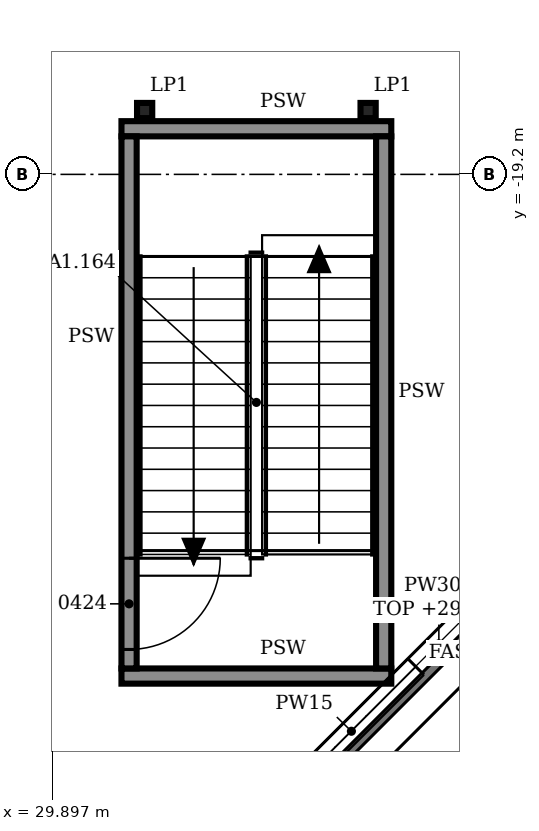
"""IFC4 building model, lengths in metres.
Left out: names, types, materials, properties, quantities, classifications, styles, units other than length and angle.
Written with IfcOpenShell. Run it as: python <this file> out.ifc"""

import sys

from ifc_helpers import new_model, si_unit, direction, frame, frame_2d, origin, origin_2d, place, context, subcontext, project, spatial, rectangle, i_section, extrude, element, fill, save


model = new_model("IFC4")
c1 = context("Model", 3, precision=1e-05, world=origin(), true_north=direction((0.0, 1.0)))
c2 = subcontext(c1, "Body", "Model", "MODEL_VIEW")
j1 = project(units=[si_unit("LENGTHUNIT", "METRE"), si_unit("PLANEANGLEUNIT", "RADIAN")], contexts=[c1])
p1 = place(None, origin())
s1 = spatial("IfcSite", under=j1, at=p1, CompositionType="ELEMENT")
p2 = place(p1, origin())
s2 = spatial("IfcBuilding", under=s1, at=p2, CompositionType="ELEMENT")
p3 = place(p2, frame((0.0, 0.0, 25.8)))
s3 = spatial("IfcBuildingStorey", under=s2, at=p3, CompositionType="ELEMENT", Elevation=25.8)
for number, where, z_axis, x_axis in (
    (1, (31.105, -18.36, 0.0), (0.0, 0.0, 1.0), (1.0, 0.0, 0.0)),
    (2, (34.045, -18.36, 0.0), (0.0, 0.0, 1.0), (1.0, 0.0, 0.0)),
):
    element("IfcColumn", number, at=place(p3, frame(where, z_axis=z_axis, x_axis=x_axis)), inside=s3, PredefinedType="COLUMN", context=c2, shape_type="SweptSolid", body=[
        extrude(i_section(OverallWidth=0.2, OverallDepth=0.2, WebThickness=0.009, FlangeThickness=0.015, FilletRadius=0.018, at=origin_2d()), origin(), (0.0, 0.0, 1.0), 4.8),
    ])
p4 = place(p3, frame((32.675, -27.677, 0.0), z_axis=(0.0, 0.0, 1.0), x_axis=(0.707088024292, 0.707125537583, 0.0)))
e3 = element("IfcWall", 3, at=p4, inside=s3, PredefinedType="SOLIDWALL", context=c2, shape_type="SweptSolid", body=[
    extrude(rectangle(XDim=6.508, YDim=0.3, at=frame_2d((3.254, 0.0))), origin(), (0.0, 0.0, 1.0), 4.0),
])
p5 = place(p4, frame((0.427, 0.0, 0.9)))
e4 = element("IfcOpeningElement", 4, at=p5, cuts=e3, PredefinedType="OPENING", context=c2, shape_type="SweptSolid", body=[
    extrude(rectangle(XDim=2.4, YDim=1.5, at=frame_2d((1.2, 0.75))), frame((0.0, 0.16, 0.0), z_axis=(0.0, -1.0, 0.0), x_axis=(1.0, 0.0, 0.0)), (0.0, 0.0, 1.0), 0.32),
])
p6 = place(p4, frame((3.681, 0.0, 0.9)))
e5 = element("IfcOpeningElement", 5, at=p6, cuts=e3, PredefinedType="OPENING", context=c2, shape_type="SweptSolid", body=[
    extrude(rectangle(XDim=2.4, YDim=1.5, at=frame_2d((1.2, 0.75))), frame((0.0, 0.16, 0.0), z_axis=(0.0, -1.0, 0.0), x_axis=(1.0, 0.0, 0.0)), (0.0, 0.0, 1.0), 0.32),
])
p7 = place(p3, frame((30.8, -25.8, 0.0), z_axis=(0.0, 0.0, 1.0), x_axis=(1.0, 0.0, 0.0)))
e6 = element("IfcWall", 6, at=p7, inside=s3, PredefinedType="SOLIDWALL", context=c2, shape_type="SweptSolid", body=[
    extrude(rectangle(XDim=3.55, YDim=0.2, at=frame_2d((1.775, 0.0))), origin(), (0.0, 0.0, 1.0), 4.6),
])
p8 = place(p3, frame((30.9, -25.7, 0.0), z_axis=(0.0, 0.0, 1.0), x_axis=(0.0, 1.0, 0.0)))
e7 = element("IfcWall", 7, at=p8, inside=s3, PredefinedType="SOLIDWALL", context=c2, shape_type="SweptSolid", body=[
    extrude(rectangle(XDim=7.0, YDim=0.2, at=frame_2d((3.5, 0.0))), origin(), (0.0, 0.0, 1.0), 4.6),
])
p9 = place(p8, frame((0.25, 0.0, 0.0)))
e8 = element("IfcOpeningElement", 8, at=p9, cuts=e7, PredefinedType="OPENING", context=c2, shape_type="SweptSolid", body=[
    extrude(rectangle(XDim=1.2, YDim=2.1, at=frame_2d((0.6, 1.05))), frame((0.0, 0.11, 0.0), z_axis=(0.0, -1.0, 0.0), x_axis=(1.0, 0.0, 0.0)), (0.0, 0.0, 1.0), 0.22),
])
p10 = place(p3, frame((34.25, -25.7, 0.0), z_axis=(0.0, 0.0, 1.0), x_axis=(0.0, 1.0, 0.0)))
e9 = element("IfcWall", 9, at=p10, inside=s3, PredefinedType="SOLIDWALL", context=c2, shape_type="SweptSolid", body=[
    extrude(rectangle(XDim=7.0, YDim=0.2, at=frame_2d((3.5, 0.0))), origin(), (0.0, 0.0, 1.0), 4.6),
])
p11 = place(p3, frame((30.8, -18.6, 0.0), z_axis=(0.0, 0.0, 1.0), x_axis=(1.0, 0.0, 0.0)))
e10 = element("IfcWall", 10, at=p11, inside=s3, PredefinedType="SOLIDWALL", context=c2, shape_type="SweptSolid", body=[
    extrude(rectangle(XDim=3.55, YDim=0.2, at=frame_2d((1.775, 0.0))), origin(), (0.0, 0.0, 1.0), 4.6),
])
p12 = place(p5, origin())
e11 = element("IfcWindow", 11, at=p12, inside=s3, PartitioningType="SINGLE_PANEL", PredefinedType="WINDOW", context=c2, shape_type="SweptSolid", body=[
    extrude(rectangle(XDim=2.4, YDim=1.5, at=frame_2d((1.2, 0.75))), frame((0.0, 0.03, 0.0), z_axis=(0.0, -1.0, 0.0), x_axis=(1.0, 0.0, 0.0)), (0.0, 0.0, 1.0), 0.06),
])
fill(e4, e11)
p13 = place(p9, frame((1.2, 0.0, 0.0), z_axis=(0.0, 0.0, 1.0), x_axis=(-1.0, 0.0, 0.0)))
e12 = element("IfcDoor", 12, at=p13, inside=s3, OperationType="SINGLE_SWING_LEFT", PredefinedType="DOOR", context=c2, shape_type="SweptSolid", body=[
    extrude(rectangle(XDim=1.2, YDim=2.1, at=frame_2d((0.6, 1.05))), frame((0.0, 0.025, 0.0), z_axis=(0.0, -1.0, 0.0), x_axis=(1.0, 0.0, 0.0)), (0.0, 0.0, 1.0), 0.05),
])
fill(e8, e12)
save(model, sys.argv[1])
